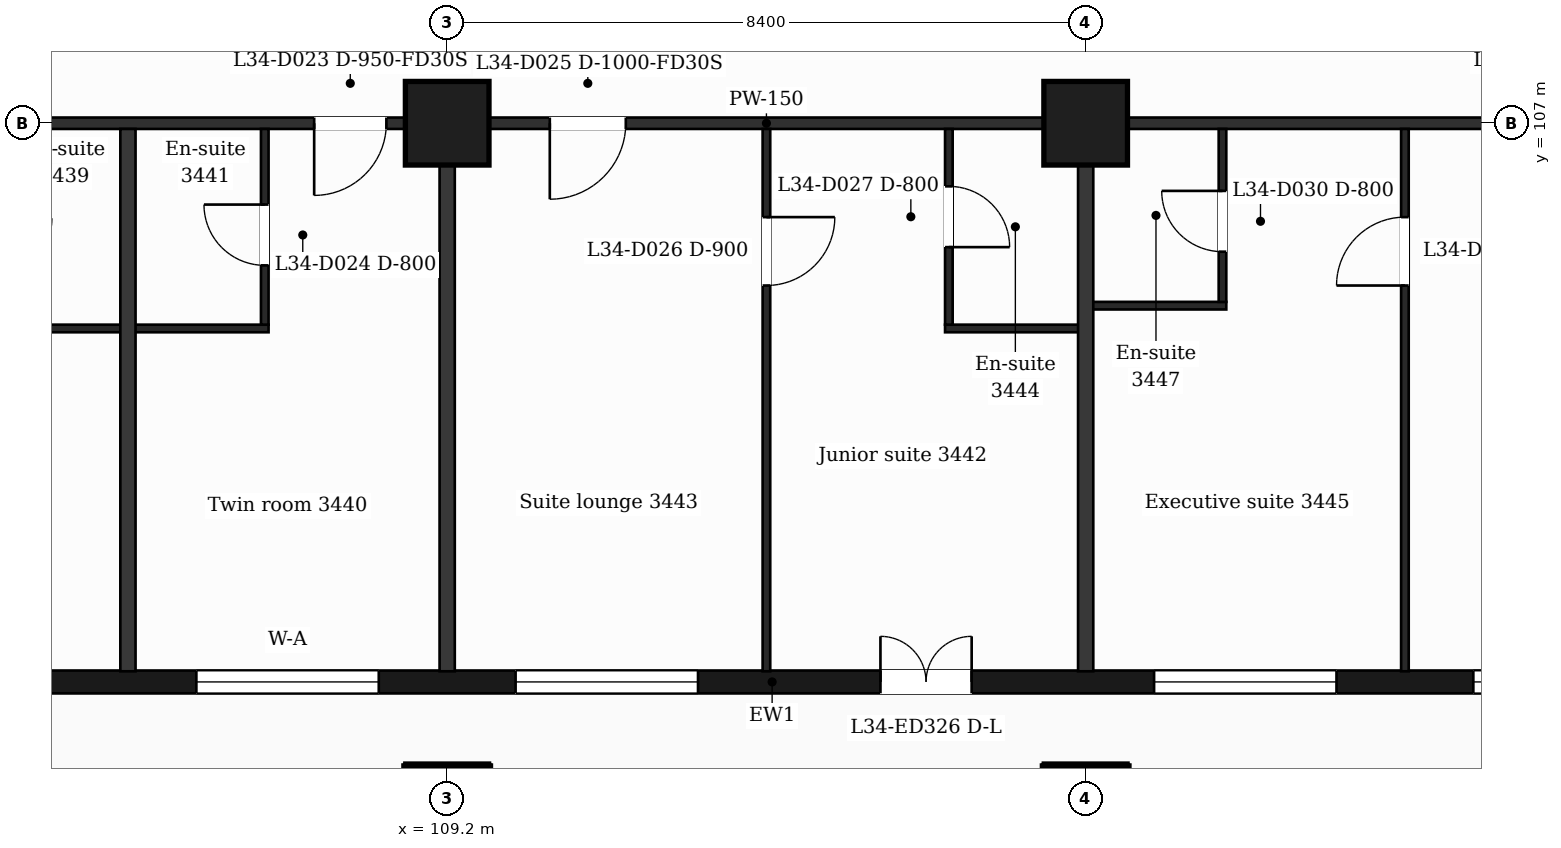
"""IFC4 building model, lengths in metres.
Left out: names, types, materials, properties, quantities, classifications, styles, units other than length and angle.
Written with IfcOpenShell. Run it as: python <this file> out.ifc"""

import sys

from ifc_helpers import new_model, si_unit, direction, frame, frame_2d, origin, origin_2d, place, context, subcontext, project, spatial, rectangle, extrude, element, fill, save


model = new_model("IFC4")
c1 = context("Model", 3, precision=1e-05, world=origin(), true_north=direction((0.0, 1.0)))
c2 = subcontext(c1, "Body", "Model", "MODEL_VIEW")
j1 = project(units=[si_unit("LENGTHUNIT", "METRE"), si_unit("PLANEANGLEUNIT", "RADIAN")], contexts=[c1])
p1 = place(None, origin())
s1 = spatial("IfcSite", under=j1, at=p1, CompositionType="ELEMENT")
p2 = place(p1, origin())
s2 = spatial("IfcBuilding", under=s1, at=p2, CompositionType="ELEMENT")
p3 = place(p2, frame((0.0, 0.0, 147.8)))
s3 = spatial("IfcBuildingStorey", under=s2, at=p3, CompositionType="ELEMENT", Elevation=147.8)
for number, where, z_axis, x_axis in (
    (1, (109.2, 98.0, 0.0), (0.0, 0.0, 1.0), (1.0, 0.0, 0.0)),
    (2, (117.6, 98.0, 0.0), (0.0, 0.0, 1.0), (1.0, 0.0, 0.0)),
    (3, (109.2, 107.0, 0.0), (0.0, 0.0, 1.0), (1.0, 0.0, 0.0)),
    (4, (117.6, 107.0, 0.0), (0.0, 0.0, 1.0), (1.0, 0.0, 0.0)),
):
    element("IfcColumn", number, at=place(p3, frame(where, z_axis=z_axis, x_axis=x_axis)), inside=s3, PredefinedType="COLUMN", context=c2, shape_type="SweptSolid", body=[
        extrude(rectangle(XDim=1.1, YDim=1.1, at=origin_2d()), origin(), (0.0, 0.0, 1.0), 3.7),
    ])
p4 = place(p3, frame((89.85, 99.65, 0.0), z_axis=(0.0, 0.0, 1.0), x_axis=(1.0, 0.0, 0.0)))
e5 = element("IfcWall", 5, at=p4, inside=s3, PredefinedType="SOLIDWALL", context=c2, shape_type="SweptSolid", body=[
    extrude(rectangle(XDim=47.25, YDim=0.3, at=frame_2d((23.625, 0.0))), origin(), (0.0, 0.0, 1.0), 3.38),
])
p5 = place(p4, frame((0.725, 0.0, 0.9)))
e6 = element("IfcOpeningElement", 6, at=p5, cuts=e5, PredefinedType="OPENING", context=c2, shape_type="SweptSolid", body=[
    extrude(rectangle(XDim=1.2, YDim=2.1, at=frame_2d((0.6, 1.05))), frame((0.0, 0.16, 0.0), z_axis=(0.0, -1.0, 0.0), x_axis=(1.0, 0.0, 0.0)), (0.0, 0.0, 1.0), 0.32),
])
p6 = place(p4, frame((3.45, 0.0, 0.9)))
e7 = element("IfcOpeningElement", 7, at=p6, cuts=e5, PredefinedType="OPENING", context=c2, shape_type="SweptSolid", body=[
    extrude(rectangle(XDim=2.4, YDim=2.1, at=frame_2d((1.2, 1.05))), frame((0.0, 0.16, 0.0), z_axis=(0.0, -1.0, 0.0), x_axis=(1.0, 0.0, 0.0)), (0.0, 0.0, 1.0), 0.32),
])
p7 = place(p4, frame((8.25, 0.0, 0.9)))
e8 = element("IfcOpeningElement", 8, at=p7, cuts=e5, PredefinedType="OPENING", context=c2, shape_type="SweptSolid", body=[
    extrude(rectangle(XDim=1.2, YDim=2.1, at=frame_2d((0.6, 1.05))), frame((0.0, 0.16, 0.0), z_axis=(0.0, -1.0, 0.0), x_axis=(1.0, 0.0, 0.0)), (0.0, 0.0, 1.0), 0.32),
])
p8 = place(p4, frame((12.45, 0.0, 0.9)))
e9 = element("IfcOpeningElement", 9, at=p8, cuts=e5, PredefinedType="OPENING", context=c2, shape_type="SweptSolid", body=[
    extrude(rectangle(XDim=1.2, YDim=2.1, at=frame_2d((0.6, 1.05))), frame((0.0, 0.16, 0.0), z_axis=(0.0, -1.0, 0.0), x_axis=(1.0, 0.0, 0.0)), (0.0, 0.0, 1.0), 0.32),
])
p9 = place(p4, frame((16.05, 0.0, 0.9)))
e10 = element("IfcOpeningElement", 10, at=p9, cuts=e5, PredefinedType="OPENING", context=c2, shape_type="SweptSolid", body=[
    extrude(rectangle(XDim=2.4, YDim=2.1, at=frame_2d((1.2, 1.05))), frame((0.0, 0.16, 0.0), z_axis=(0.0, -1.0, 0.0), x_axis=(1.0, 0.0, 0.0)), (0.0, 0.0, 1.0), 0.32),
])
p10 = place(p4, frame((20.25, 0.0, 0.9)))
e11 = element("IfcOpeningElement", 11, at=p10, cuts=e5, PredefinedType="OPENING", context=c2, shape_type="SweptSolid", body=[
    extrude(rectangle(XDim=2.4, YDim=2.1, at=frame_2d((1.2, 1.05))), frame((0.0, 0.16, 0.0), z_axis=(0.0, -1.0, 0.0), x_axis=(1.0, 0.0, 0.0)), (0.0, 0.0, 1.0), 0.32),
])
p11 = place(p4, frame((25.05, 0.0, 0.0)))
e12 = element("IfcOpeningElement", 12, at=p11, cuts=e5, PredefinedType="OPENING", context=c2, shape_type="SweptSolid", body=[
    extrude(rectangle(XDim=1.2, YDim=2.4, at=frame_2d((0.6, 1.2))), frame((0.0, 0.16, 0.0), z_axis=(0.0, -1.0, 0.0), x_axis=(1.0, 0.0, 0.0)), (0.0, 0.0, 1.0), 0.32),
])
p12 = place(p4, frame((28.65, 0.0, 0.9)))
e13 = element("IfcOpeningElement", 13, at=p12, cuts=e5, PredefinedType="OPENING", context=c2, shape_type="SweptSolid", body=[
    extrude(rectangle(XDim=2.4, YDim=2.1, at=frame_2d((1.2, 1.05))), frame((0.0, 0.16, 0.0), z_axis=(0.0, -1.0, 0.0), x_axis=(1.0, 0.0, 0.0)), (0.0, 0.0, 1.0), 0.32),
])
p13 = place(p4, frame((32.85, 0.0, 0.9)))
e14 = element("IfcOpeningElement", 14, at=p13, cuts=e5, PredefinedType="OPENING", context=c2, shape_type="SweptSolid", body=[
    extrude(rectangle(XDim=2.4, YDim=2.1, at=frame_2d((1.2, 1.05))), frame((0.0, 0.16, 0.0), z_axis=(0.0, -1.0, 0.0), x_axis=(1.0, 0.0, 0.0)), (0.0, 0.0, 1.0), 0.32),
])
p14 = place(p4, frame((37.65, 0.0, 0.9)))
e15 = element("IfcOpeningElement", 15, at=p14, cuts=e5, PredefinedType="OPENING", context=c2, shape_type="SweptSolid", body=[
    extrude(rectangle(XDim=1.2, YDim=2.1, at=frame_2d((0.6, 1.05))), frame((0.0, 0.16, 0.0), z_axis=(0.0, -1.0, 0.0), x_axis=(1.0, 0.0, 0.0)), (0.0, 0.0, 1.0), 0.32),
])
p15 = place(p4, frame((41.85, 0.0, 0.9)))
e16 = element("IfcOpeningElement", 16, at=p15, cuts=e5, PredefinedType="OPENING", context=c2, shape_type="SweptSolid", body=[
    extrude(rectangle(XDim=1.2, YDim=2.1, at=frame_2d((0.6, 1.05))), frame((0.0, 0.16, 0.0), z_axis=(0.0, -1.0, 0.0), x_axis=(1.0, 0.0, 0.0)), (0.0, 0.0, 1.0), 0.32),
])
p16 = place(p4, frame((45.25, 0.0, 0.9)))
e17 = element("IfcOpeningElement", 17, at=p16, cuts=e5, PredefinedType="OPENING", context=c2, shape_type="SweptSolid", body=[
    extrude(rectangle(XDim=1.2, YDim=2.1, at=frame_2d((0.6, 1.05))), frame((0.0, 0.16, 0.0), z_axis=(0.0, -1.0, 0.0), x_axis=(1.0, 0.0, 0.0)), (0.0, 0.0, 1.0), 0.32),
])
p17 = place(p3, frame((103.15, 104.3, 0.0), z_axis=(0.0, 0.0, 1.0), x_axis=(1.0, 0.0, 0.0)))
e18 = element("IfcWall", 18, at=p17, inside=s3, PredefinedType="PARTITIONING", context=c2, shape_type="SweptSolid", body=[
    extrude(rectangle(XDim=3.7, YDim=0.1, at=frame_2d((1.85, 0.0))), origin(), (0.0, 0.0, 1.0), 3.38),
])
p18 = place(p3, frame((115.75, 104.3, 0.0), z_axis=(0.0, 0.0, 1.0), x_axis=(1.0, 0.0, 0.0)))
e19 = element("IfcWall", 19, at=p18, inside=s3, PredefinedType="PARTITIONING", context=c2, shape_type="SweptSolid", body=[
    extrude(rectangle(XDim=1.85, YDim=0.1, at=frame_2d((0.925, 0.0))), origin(), (0.0, 0.0, 1.0), 3.38),
])
p19 = place(p3, frame((117.6, 104.6, 0.0), z_axis=(0.0, 0.0, 1.0), x_axis=(1.0, 0.0, 0.0)))
e20 = element("IfcWall", 20, at=p19, inside=s3, PredefinedType="PARTITIONING", context=c2, shape_type="SweptSolid", body=[
    extrude(rectangle(XDim=1.85, YDim=0.1, at=frame_2d((0.925, 0.0))), origin(), (0.0, 0.0, 1.0), 3.38),
])
p20 = place(p3, frame((87.018, 107.0, 0.0), z_axis=(0.0, 0.0, 1.0), x_axis=(1.0, 0.0, 0.0)))
e21 = element("IfcWall", 21, at=p20, inside=s3, PredefinedType="PARTITIONING", context=c2, shape_type="SweptSolid", body=[
    extrude(rectangle(XDim=52.765, YDim=0.15, at=frame_2d((26.382, 0.0))), origin(), (0.0, 0.0, 1.0), 3.38),
])
p21 = place(p20, frame((0.707, 0.0, 0.0)))
e22 = element("IfcOpeningElement", 22, at=p21, cuts=e21, PredefinedType="OPENING", context=c2, shape_type="SweptSolid", body=[
    extrude(rectangle(XDim=0.95, YDim=2.1, at=frame_2d((0.475, 1.05))), frame((0.0, 0.085, 0.0), z_axis=(0.0, -1.0, 0.0), x_axis=(1.0, 0.0, 0.0)), (0.0, 0.0, 1.0), 0.17),
])
p22 = place(p20, frame((7.645, 0.0, 0.0)))
e23 = element("IfcOpeningElement", 23, at=p22, cuts=e21, PredefinedType="OPENING", context=c2, shape_type="SweptSolid", body=[
    extrude(rectangle(XDim=0.95, YDim=2.1, at=frame_2d((0.475, 1.05))), frame((0.0, 0.085, 0.0), z_axis=(0.0, -1.0, 0.0), x_axis=(1.0, 0.0, 0.0)), (0.0, 0.0, 1.0), 0.17),
])
p23 = place(p20, frame((12.067, 0.0, 0.0)))
e24 = element("IfcOpeningElement", 24, at=p23, cuts=e21, PredefinedType="OPENING", context=c2, shape_type="SweptSolid", body=[
    extrude(rectangle(XDim=0.95, YDim=2.1, at=frame_2d((0.475, 1.05))), frame((0.0, 0.085, 0.0), z_axis=(0.0, -1.0, 0.0), x_axis=(1.0, 0.0, 0.0)), (0.0, 0.0, 1.0), 0.17),
])
p24 = place(p20, frame((14.582, 0.0, 0.0)))
e25 = element("IfcOpeningElement", 25, at=p24, cuts=e21, PredefinedType="OPENING", context=c2, shape_type="SweptSolid", body=[
    extrude(rectangle(XDim=0.95, YDim=2.1, at=frame_2d((0.475, 1.05))), frame((0.0, 0.085, 0.0), z_axis=(0.0, -1.0, 0.0), x_axis=(1.0, 0.0, 0.0)), (0.0, 0.0, 1.0), 0.17),
])
p25 = place(p20, frame((20.432, 0.0, 0.0)))
e26 = element("IfcOpeningElement", 26, at=p25, cuts=e21, PredefinedType="OPENING", context=c2, shape_type="SweptSolid", body=[
    extrude(rectangle(XDim=0.95, YDim=2.1, at=frame_2d((0.475, 1.05))), frame((0.0, 0.085, 0.0), z_axis=(0.0, -1.0, 0.0), x_axis=(1.0, 0.0, 0.0)), (0.0, 0.0, 1.0), 0.17),
])
p26 = place(p20, frame((23.532, 0.0, 0.0)))
e27 = element("IfcOpeningElement", 27, at=p26, cuts=e21, PredefinedType="OPENING", context=c2, shape_type="SweptSolid", body=[
    extrude(rectangle(XDim=1.0, YDim=2.1, at=frame_2d((0.5, 1.05))), frame((0.0, 0.085, 0.0), z_axis=(0.0, -1.0, 0.0), x_axis=(1.0, 0.0, 0.0)), (0.0, 0.0, 1.0), 0.17),
])
p27 = place(p20, frame((36.807, 0.0, 0.0)))
e28 = element("IfcOpeningElement", 28, at=p27, cuts=e21, PredefinedType="OPENING", context=c2, shape_type="SweptSolid", body=[
    extrude(rectangle(XDim=1.0, YDim=2.1, at=frame_2d((0.5, 1.05))), frame((0.0, 0.085, 0.0), z_axis=(0.0, -1.0, 0.0), x_axis=(1.0, 0.0, 0.0)), (0.0, 0.0, 1.0), 0.17),
])
p28 = place(p20, frame((43.457, 0.0, 0.0)))
e29 = element("IfcOpeningElement", 29, at=p28, cuts=e21, PredefinedType="OPENING", context=c2, shape_type="SweptSolid", body=[
    extrude(rectangle(XDim=0.95, YDim=2.1, at=frame_2d((0.475, 1.05))), frame((0.0, 0.085, 0.0), z_axis=(0.0, -1.0, 0.0), x_axis=(1.0, 0.0, 0.0)), (0.0, 0.0, 1.0), 0.17),
])
p29 = place(p20, frame((48.974, 0.0, 0.0)))
e30 = element("IfcOpeningElement", 30, at=p29, cuts=e21, PredefinedType="OPENING", context=c2, shape_type="SweptSolid", body=[
    extrude(rectangle(XDim=0.95, YDim=2.1, at=frame_2d((0.475, 1.05))), frame((0.0, 0.085, 0.0), z_axis=(0.0, -1.0, 0.0), x_axis=(1.0, 0.0, 0.0)), (0.0, 0.0, 1.0), 0.17),
])
p30 = place(p3, frame((105.0, 99.79, 0.0), z_axis=(0.0, 0.0, 1.0), x_axis=(0.0, 1.0, 0.0)))
e31 = element("IfcWall", 31, at=p30, inside=s3, PredefinedType="PARTITIONING", context=c2, shape_type="SweptSolid", body=[
    extrude(rectangle(XDim=7.135, YDim=0.2, at=frame_2d((3.567, 0.0))), origin(), (0.0, 0.0, 1.0), 3.38),
])
p31 = place(p3, frame((106.8, 104.35, 0.0), z_axis=(0.0, 0.0, 1.0), x_axis=(0.0, 1.0, 0.0)))
e32 = element("IfcWall", 32, at=p31, inside=s3, PredefinedType="PARTITIONING", context=c2, shape_type="SweptSolid", body=[
    extrude(rectangle(XDim=2.575, YDim=0.1, at=frame_2d((1.288, 0.0))), origin(), (0.0, 0.0, 1.0), 3.38),
])
p32 = place(p31, frame((0.78, 0.0, 0.0)))
e33 = element("IfcOpeningElement", 33, at=p32, cuts=e32, PredefinedType="OPENING", context=c2, shape_type="SweptSolid", body=[
    extrude(rectangle(XDim=0.8, YDim=2.1, at=frame_2d((0.4, 1.05))), frame((0.0, 0.06, 0.0), z_axis=(0.0, -1.0, 0.0), x_axis=(1.0, 0.0, 0.0)), (0.0, 0.0, 1.0), 0.12),
])
p33 = place(p3, frame((109.2, 99.79, 0.0), z_axis=(0.0, 0.0, 1.0), x_axis=(0.0, 1.0, 0.0)))
e34 = element("IfcWall", 34, at=p33, inside=s3, PredefinedType="PARTITIONING", context=c2, shape_type="SweptSolid", body=[
    extrude(rectangle(XDim=7.135, YDim=0.2, at=frame_2d((3.567, 0.0))), origin(), (0.0, 0.0, 1.0), 3.38),
])
p34 = place(p3, frame((113.4, 99.79, 0.0), z_axis=(0.0, 0.0, 1.0), x_axis=(0.0, 1.0, 0.0)))
e35 = element("IfcWall", 35, at=p34, inside=s3, PredefinedType="PARTITIONING", context=c2, shape_type="SweptSolid", body=[
    extrude(rectangle(XDim=7.135, YDim=0.1, at=frame_2d((3.567, 0.0))), origin(), (0.0, 0.0, 1.0), 3.38),
])
p35 = place(p34, frame((5.075, 0.0, 0.0)))
e36 = element("IfcOpeningElement", 36, at=p35, cuts=e35, PredefinedType="OPENING", context=c2, shape_type="SweptSolid", body=[
    extrude(rectangle(XDim=0.9, YDim=2.1, at=frame_2d((0.45, 1.05))), frame((0.0, 0.06, 0.0), z_axis=(0.0, -1.0, 0.0), x_axis=(1.0, 0.0, 0.0)), (0.0, 0.0, 1.0), 0.12),
])
p36 = place(p3, frame((115.8, 104.35, 0.0), z_axis=(0.0, 0.0, 1.0), x_axis=(0.0, 1.0, 0.0)))
e37 = element("IfcWall", 37, at=p36, inside=s3, PredefinedType="PARTITIONING", context=c2, shape_type="SweptSolid", body=[
    extrude(rectangle(XDim=2.575, YDim=0.1, at=frame_2d((1.288, 0.0))), origin(), (0.0, 0.0, 1.0), 3.38),
])
p37 = place(p36, frame((1.02, 0.0, 0.0)))
e38 = element("IfcOpeningElement", 38, at=p37, cuts=e37, PredefinedType="OPENING", context=c2, shape_type="SweptSolid", body=[
    extrude(rectangle(XDim=0.8, YDim=2.1, at=frame_2d((0.4, 1.05))), frame((0.0, 0.06, 0.0), z_axis=(0.0, -1.0, 0.0), x_axis=(1.0, 0.0, 0.0)), (0.0, 0.0, 1.0), 0.12),
])
p38 = place(p3, frame((117.6, 99.79, 0.0), z_axis=(0.0, 0.0, 1.0), x_axis=(0.0, 1.0, 0.0)))
e39 = element("IfcWall", 39, at=p38, inside=s3, PredefinedType="PARTITIONING", context=c2, shape_type="SweptSolid", body=[
    extrude(rectangle(XDim=7.135, YDim=0.2, at=frame_2d((3.567, 0.0))), origin(), (0.0, 0.0, 1.0), 3.38),
])
p39 = place(p3, frame((119.4, 104.65, 0.0), z_axis=(0.0, 0.0, 1.0), x_axis=(0.0, 1.0, 0.0)))
e40 = element("IfcWall", 40, at=p39, inside=s3, PredefinedType="PARTITIONING", context=c2, shape_type="SweptSolid", body=[
    extrude(rectangle(XDim=2.275, YDim=0.1, at=frame_2d((1.138, 0.0))), origin(), (0.0, 0.0, 1.0), 3.38),
])
p40 = place(p39, frame((0.66, 0.0, 0.0)))
e41 = element("IfcOpeningElement", 41, at=p40, cuts=e40, PredefinedType="OPENING", context=c2, shape_type="SweptSolid", body=[
    extrude(rectangle(XDim=0.8, YDim=2.1, at=frame_2d((0.4, 1.05))), frame((0.0, 0.06, 0.0), z_axis=(0.0, -1.0, 0.0), x_axis=(1.0, 0.0, 0.0)), (0.0, 0.0, 1.0), 0.12),
])
p41 = place(p3, frame((121.8, 99.79, 0.0), z_axis=(0.0, 0.0, 1.0), x_axis=(0.0, 1.0, 0.0)))
e42 = element("IfcWall", 42, at=p41, inside=s3, PredefinedType="PARTITIONING", context=c2, shape_type="SweptSolid", body=[
    extrude(rectangle(XDim=7.135, YDim=0.1, at=frame_2d((3.567, 0.0))), origin(), (0.0, 0.0, 1.0), 3.38),
])
p42 = place(p41, frame((5.075, 0.0, 0.0)))
e43 = element("IfcOpeningElement", 43, at=p42, cuts=e42, PredefinedType="OPENING", context=c2, shape_type="SweptSolid", body=[
    extrude(rectangle(XDim=0.9, YDim=2.1, at=frame_2d((0.45, 1.05))), frame((0.0, 0.06, 0.0), z_axis=(0.0, -1.0, 0.0), x_axis=(1.0, 0.0, 0.0)), (0.0, 0.0, 1.0), 0.12),
])
p43 = place(p9, origin())
e44 = element("IfcWindow", 44, at=p43, inside=s3, PartitioningType="SINGLE_PANEL", PredefinedType="WINDOW", context=c2, shape_type="SweptSolid", body=[
    extrude(rectangle(XDim=2.4, YDim=2.1, at=frame_2d((1.2, 1.05))), frame((0.0, 0.03, 0.0), z_axis=(0.0, -1.0, 0.0), x_axis=(1.0, 0.0, 0.0)), (0.0, 0.0, 1.0), 0.06),
])
fill(e10, e44)
p44 = place(p10, origin())
e45 = element("IfcWindow", 45, at=p44, inside=s3, PartitioningType="SINGLE_PANEL", PredefinedType="WINDOW", context=c2, shape_type="SweptSolid", body=[
    extrude(rectangle(XDim=2.4, YDim=2.1, at=frame_2d((1.2, 1.05))), frame((0.0, 0.03, 0.0), z_axis=(0.0, -1.0, 0.0), x_axis=(1.0, 0.0, 0.0)), (0.0, 0.0, 1.0), 0.06),
])
fill(e11, e45)
p45 = place(p11, origin())
e46 = element("IfcDoor", 46, at=p45, inside=s3, OperationType="DOUBLE_DOOR_SINGLE_SWING", PredefinedType="DOOR", context=c2, shape_type="SweptSolid", body=[
    extrude(rectangle(XDim=1.2, YDim=2.4, at=frame_2d((0.6, 1.2))), frame((0.0, 0.025, 0.0), z_axis=(0.0, -1.0, 0.0), x_axis=(1.0, 0.0, 0.0)), (0.0, 0.0, 1.0), 0.05),
])
fill(e12, e46)
p46 = place(p12, origin())
e47 = element("IfcWindow", 47, at=p46, inside=s3, PartitioningType="SINGLE_PANEL", PredefinedType="WINDOW", context=c2, shape_type="SweptSolid", body=[
    extrude(rectangle(XDim=2.4, YDim=2.1, at=frame_2d((1.2, 1.05))), frame((0.0, 0.03, 0.0), z_axis=(0.0, -1.0, 0.0), x_axis=(1.0, 0.0, 0.0)), (0.0, 0.0, 1.0), 0.06),
])
fill(e13, e47)
p47 = place(p13, origin())
e48 = element("IfcWindow", 48, at=p47, inside=s3, PartitioningType="SINGLE_PANEL", PredefinedType="WINDOW", context=c2, shape_type="SweptSolid", body=[
    extrude(rectangle(XDim=2.4, YDim=2.1, at=frame_2d((1.2, 1.05))), frame((0.0, 0.03, 0.0), z_axis=(0.0, -1.0, 0.0), x_axis=(1.0, 0.0, 0.0)), (0.0, 0.0, 1.0), 0.06),
])
fill(e14, e48)
p48 = place(p25, origin())
e49 = element("IfcDoor", 49, at=p48, inside=s3, OperationType="SINGLE_SWING_LEFT", PredefinedType="DOOR", context=c2, shape_type="SweptSolid", body=[
    extrude(rectangle(XDim=0.95, YDim=2.1, at=frame_2d((0.475, 1.05))), frame((0.0, 0.025, 0.0), z_axis=(0.0, -1.0, 0.0), x_axis=(1.0, 0.0, 0.0)), (0.0, 0.0, 1.0), 0.05),
])
fill(e26, e49)
p49 = place(p32, origin())
e50 = element("IfcDoor", 50, at=p49, inside=s3, OperationType="SINGLE_SWING_RIGHT", PredefinedType="DOOR", context=c2, shape_type="SweptSolid", body=[
    extrude(rectangle(XDim=0.8, YDim=2.1, at=frame_2d((0.4, 1.05))), frame((0.0, 0.025, 0.0), z_axis=(0.0, -1.0, 0.0), x_axis=(1.0, 0.0, 0.0)), (0.0, 0.0, 1.0), 0.05),
])
fill(e33, e50)
p50 = place(p26, origin())
e51 = element("IfcDoor", 51, at=p50, inside=s3, OperationType="SINGLE_SWING_LEFT", PredefinedType="DOOR", context=c2, shape_type="SweptSolid", body=[
    extrude(rectangle(XDim=1.0, YDim=2.1, at=frame_2d((0.5, 1.05))), frame((0.0, 0.025, 0.0), z_axis=(0.0, -1.0, 0.0), x_axis=(1.0, 0.0, 0.0)), (0.0, 0.0, 1.0), 0.05),
])
fill(e27, e51)
p51 = place(p35, origin())
e52 = element("IfcDoor", 52, at=p51, inside=s3, OperationType="SINGLE_SWING_RIGHT", PredefinedType="DOOR", context=c2, shape_type="SweptSolid", body=[
    extrude(rectangle(XDim=0.9, YDim=2.1, at=frame_2d((0.45, 1.05))), frame((0.0, 0.025, 0.0), z_axis=(0.0, -1.0, 0.0), x_axis=(1.0, 0.0, 0.0)), (0.0, 0.0, 1.0), 0.05),
])
fill(e36, e52)
p52 = place(p37, origin())
e53 = element("IfcDoor", 53, at=p52, inside=s3, OperationType="SINGLE_SWING_LEFT", PredefinedType="DOOR", context=c2, shape_type="SweptSolid", body=[
    extrude(rectangle(XDim=0.8, YDim=2.1, at=frame_2d((0.4, 1.05))), frame((0.0, 0.025, 0.0), z_axis=(0.0, -1.0, 0.0), x_axis=(1.0, 0.0, 0.0)), (0.0, 0.0, 1.0), 0.05),
])
fill(e38, e53)
p53 = place(p42, origin())
e54 = element("IfcDoor", 54, at=p53, inside=s3, OperationType="SINGLE_SWING_LEFT", PredefinedType="DOOR", context=c2, shape_type="SweptSolid", body=[
    extrude(rectangle(XDim=0.9, YDim=2.1, at=frame_2d((0.45, 1.05))), frame((0.0, 0.025, 0.0), z_axis=(0.0, -1.0, 0.0), x_axis=(1.0, 0.0, 0.0)), (0.0, 0.0, 1.0), 0.05),
])
fill(e43, e54)
p54 = place(p40, origin())
e55 = element("IfcDoor", 55, at=p54, inside=s3, OperationType="SINGLE_SWING_RIGHT", PredefinedType="DOOR", context=c2, shape_type="SweptSolid", body=[
    extrude(rectangle(XDim=0.8, YDim=2.1, at=frame_2d((0.4, 1.05))), frame((0.0, 0.025, 0.0), z_axis=(0.0, -1.0, 0.0), x_axis=(1.0, 0.0, 0.0)), (0.0, 0.0, 1.0), 0.05),
])
fill(e41, e55)
save(model, sys.argv[1])
